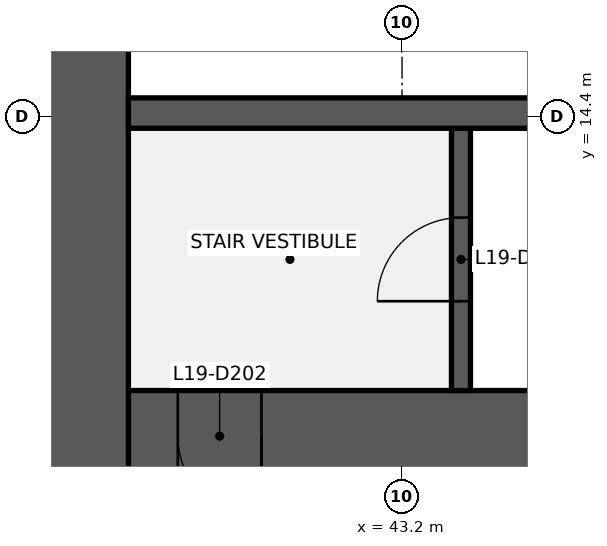
"""IFC4 building model, lengths in metres.
Left out: names, types, materials, properties, quantities, classifications, styles, units other than length and angle.
Written with IfcOpenShell. Run it as: python <this file> out.ifc"""

import sys

from ifc_helpers import new_model, si_unit, direction, frame, frame_2d, origin, place, context, subcontext, project, spatial, rectangle, extrude, element, fill, save


model = new_model("IFC4")
c1 = context("Model", 3, precision=1e-05, world=origin(), true_north=direction((0.0, 1.0)))
c2 = subcontext(c1, "Body", "Model", "MODEL_VIEW")
j1 = project(units=[si_unit("LENGTHUNIT", "METRE"), si_unit("PLANEANGLEUNIT", "RADIAN")], contexts=[c1])
p1 = place(None, origin())
s1 = spatial("IfcSite", under=j1, at=p1, CompositionType="ELEMENT")
p2 = place(p1, origin())
s2 = spatial("IfcBuilding", under=s1, at=p2, CompositionType="ELEMENT")
p3 = place(p2, frame((0.0, 0.0, 87.0)))
s3 = spatial("IfcBuildingStorey", under=s2, at=p3, CompositionType="ELEMENT", Elevation=87.0)
p4 = place(p3, frame((52.8, 10.2, 0.0), z_axis=(0.0, 0.0, 1.0), x_axis=(-1.0, 0.0, 0.0)))
e1 = element("IfcWall", 1, at=p4, inside=s3, PredefinedType="SHEAR", context=c2, shape_type="SweptSolid", body=[
    extrude(rectangle(XDim=13.2, YDim=1.2, at=frame_2d((6.6, 0.0))), origin(), (0.0, 0.0, 1.0), 4.1),
])
p5 = place(p4, frame((11.45, 0.0, 0.0)))
e2 = element("IfcOpeningElement", 2, at=p5, cuts=e1, PredefinedType="OPENING", context=c2, shape_type="SweptSolid", body=[
    extrude(rectangle(XDim=1.1, YDim=2.1, at=frame_2d((0.55, 1.05))), frame((0.0, 0.61, 0.0), z_axis=(0.0, -1.0, 0.0), x_axis=(1.0, 0.0, 0.0)), (0.0, 0.0, 1.0), 1.22),
])
p6 = place(p3, frame((39.0, 9.6, 0.0), z_axis=(0.0, 0.0, 1.0), x_axis=(0.0, 1.0, 0.0)))
e3 = element("IfcWall", 3, at=p6, inside=s3, PredefinedType="SHEAR", context=c2, shape_type="SweptSolid", body=[
    extrude(rectangle(XDim=28.8, YDim=1.2, at=frame_2d((14.4, 0.0))), origin(), (0.0, 0.0, 1.0), 4.1),
])
p7 = place(p6, frame((8.7, 0.0, 0.0)))
e4 = element("IfcOpeningElement", 4, at=p7, cuts=e3, PredefinedType="OPENING", context=c2, shape_type="SweptSolid", body=[
    extrude(rectangle(XDim=1.8, YDim=2.1, at=frame_2d((0.9, 1.05))), frame((0.0, 0.61, 0.0), z_axis=(0.0, -1.0, 0.0), x_axis=(1.0, 0.0, 0.0)), (0.0, 0.0, 1.0), 1.22),
])
p8 = place(p6, frame((18.3, 0.0, 0.0)))
e5 = element("IfcOpeningElement", 5, at=p8, cuts=e3, PredefinedType="OPENING", context=c2, shape_type="SweptSolid", body=[
    extrude(rectangle(XDim=1.8, YDim=2.1, at=frame_2d((0.9, 1.05))), frame((0.0, 0.61, 0.0), z_axis=(0.0, -1.0, 0.0), x_axis=(1.0, 0.0, 0.0)), (0.0, 0.0, 1.0), 1.22),
])
p9 = place(p3, frame((43.975, 10.8, 0.0), z_axis=(0.0, 0.0, 1.0), x_axis=(0.0, 1.0, 0.0)))
e6 = element("IfcWall", 6, at=p9, inside=s3, PredefinedType="SHEAR", context=c2, shape_type="SweptSolid", body=[
    extrude(rectangle(XDim=3.45, YDim=0.25, at=frame_2d((1.725, 0.0))), origin(), (0.0, 0.0, 1.0), 4.1),
])
p10 = place(p9, frame((1.175, 0.0, 0.0)))
e7 = element("IfcOpeningElement", 7, at=p10, cuts=e6, PredefinedType="OPENING", context=c2, shape_type="SweptSolid", body=[
    extrude(rectangle(XDim=1.1, YDim=2.1, at=frame_2d((0.55, 1.05))), frame((0.0, 0.135, 0.0), z_axis=(0.0, -1.0, 0.0), x_axis=(1.0, 0.0, 0.0)), (0.0, 0.0, 1.0), 0.27),
])
p11 = place(p3, frame((39.6, 14.45, 0.0), z_axis=(0.0, 0.0, 1.0), x_axis=(1.0, 0.0, 0.0)))
e8 = element("IfcWall", 8, at=p11, inside=s3, PredefinedType="SHEAR", context=c2, shape_type="SweptSolid", body=[
    extrude(rectangle(XDim=16.8, YDim=0.4, at=frame_2d((8.4, 0.0))), origin(), (0.0, 0.0, 1.0), 4.1),
])
p12 = place(p10, origin())
e9 = element("IfcDoor", 9, at=p12, inside=s3, OperationType="SINGLE_SWING_LEFT", PredefinedType="DOOR", context=c2, shape_type="SweptSolid", body=[
    extrude(rectangle(XDim=1.1, YDim=2.1, at=frame_2d((0.55, 1.05))), frame((0.0, 0.025, 0.0), z_axis=(0.0, -1.0, 0.0), x_axis=(1.0, 0.0, 0.0)), (0.0, 0.0, 1.0), 0.05),
])
fill(e7, e9)
p13 = place(p5, origin())
e10 = element("IfcDoor", 10, at=p13, inside=s3, OperationType="SINGLE_SWING_LEFT", PredefinedType="DOOR", context=c2, shape_type="SweptSolid", body=[
    extrude(rectangle(XDim=1.1, YDim=2.1, at=frame_2d((0.55, 1.05))), frame((0.0, 0.025, 0.0), z_axis=(0.0, -1.0, 0.0), x_axis=(1.0, 0.0, 0.0)), (0.0, 0.0, 1.0), 0.05),
])
fill(e2, e10)
save(model, sys.argv[1])
